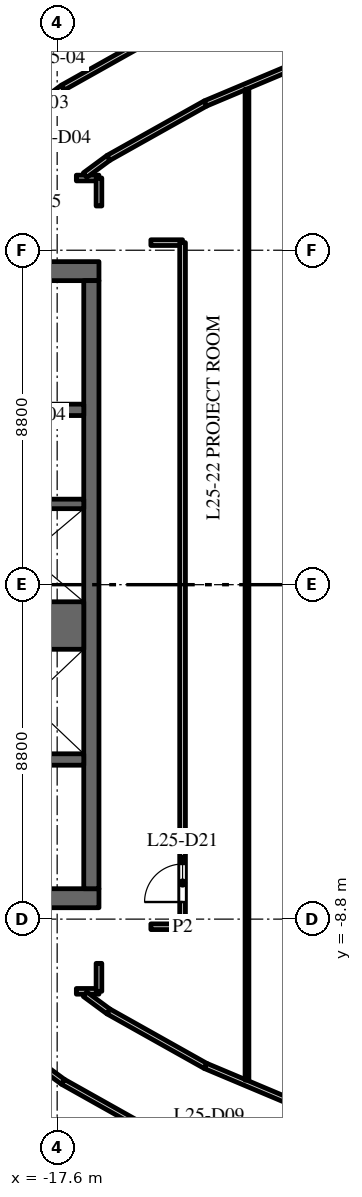
"""IFC4 building model, lengths in metres.
Left out: names, types, materials, properties, quantities, classifications, styles, units other than length and angle.
Written with IfcOpenShell. Run it as: python <this file> out.ifc"""

import sys

from ifc_helpers import new_model, si_unit, direction, frame, frame_2d, origin, place, context, subcontext, project, spatial, rectangle, extrude, element, fill, save


model = new_model("IFC4")
c1 = context("Model", 3, precision=1e-05, world=origin(), true_north=direction((0.0, 1.0)))
c2 = subcontext(c1, "Body", "Model", "MODEL_VIEW")
j1 = project(units=[si_unit("LENGTHUNIT", "METRE"), si_unit("PLANEANGLEUNIT", "RADIAN")], contexts=[c1])
p1 = place(None, origin())
s1 = spatial("IfcSite", under=j1, at=p1, CompositionType="ELEMENT")
p2 = place(p1, origin())
s2 = spatial("IfcBuilding", under=s1, at=p2, CompositionType="ELEMENT")
p3 = place(p2, frame((0.0, 0.0, 112.0)))
s3 = spatial("IfcBuildingStorey", under=s2, at=p3, CompositionType="ELEMENT", Elevation=112.0)
p4 = place(p3, frame((-16.5, 8.25, 0.0), z_axis=(0.0, 0.0, 1.0), x_axis=(-1.0, 0.0, 0.0)))
e1 = element("IfcWall", 1, at=p4, inside=s3, PredefinedType="SHEAR", context=c2, shape_type="SweptSolid", body=[
    extrude(rectangle(XDim=15.0, YDim=0.5, at=frame_2d((7.5, 0.0))), origin(), (0.0, 0.0, 1.0), 3.7),
])
p5 = place(p4, frame((6.9, 0.0, 0.0)))
e2 = element("IfcOpeningElement", 2, at=p5, cuts=e1, PredefinedType="OPENING", context=c2, shape_type="SweptSolid", body=[
    extrude(rectangle(XDim=1.2, YDim=2.1, at=frame_2d((0.6, 1.05))), frame((0.0, 0.26, 0.0), z_axis=(0.0, -1.0, 0.0), x_axis=(1.0, 0.0, 0.0)), (0.0, 0.0, 1.0), 0.52),
])
p6 = place(p4, frame((12.95, 0.0, 0.0)))
e3 = element("IfcOpeningElement", 3, at=p6, cuts=e1, PredefinedType="OPENING", context=c2, shape_type="SweptSolid", body=[
    extrude(rectangle(XDim=0.9, YDim=2.1, at=frame_2d((0.45, 1.05))), frame((0.0, 0.26, 0.0), z_axis=(0.0, -1.0, 0.0), x_axis=(1.0, 0.0, 0.0)), (0.0, 0.0, 1.0), 0.52),
])
p7 = place(p3, frame((-16.5, -8.25, 0.0), z_axis=(0.0, 0.0, 1.0), x_axis=(-1.0, 0.0, 0.0)))
e4 = element("IfcWall", 4, at=p7, inside=s3, PredefinedType="SHEAR", context=c2, shape_type="SweptSolid", body=[
    extrude(rectangle(XDim=15.0, YDim=0.5, at=frame_2d((7.5, 0.0))), origin(), (0.0, 0.0, 1.0), 3.7),
])
p8 = place(p7, frame((6.9, 0.0, 0.0)))
e5 = element("IfcOpeningElement", 5, at=p8, cuts=e4, PredefinedType="OPENING", context=c2, shape_type="SweptSolid", body=[
    extrude(rectangle(XDim=1.2, YDim=2.1, at=frame_2d((0.6, 1.05))), frame((0.0, 0.26, 0.0), z_axis=(0.0, -1.0, 0.0), x_axis=(1.0, 0.0, 0.0)), (0.0, 0.0, 1.0), 0.52),
])
p9 = place(p7, frame((12.95, 0.0, 0.0)))
e6 = element("IfcOpeningElement", 6, at=p9, cuts=e4, PredefinedType="OPENING", context=c2, shape_type="SweptSolid", body=[
    extrude(rectangle(XDim=0.9, YDim=2.1, at=frame_2d((0.45, 1.05))), frame((0.0, 0.26, 0.0), z_axis=(0.0, -1.0, 0.0), x_axis=(1.0, 0.0, 0.0)), (0.0, 0.0, 1.0), 0.52),
])
p10 = place(p3, frame((-16.7, -8.0, 0.0), z_axis=(0.0, 0.0, 1.0), x_axis=(0.0, 1.0, 0.0)))
e7 = element("IfcWall", 7, at=p10, inside=s3, PredefinedType="SHEAR", context=c2, shape_type="SweptSolid", body=[
    extrude(rectangle(XDim=16.0, YDim=0.4, at=frame_2d((8.0, 0.0))), origin(), (0.0, 0.0, 1.0), 3.7),
])
p11 = place(p3, frame((-16.9, -1.075, 0.0), z_axis=(0.0, 0.0, 1.0), x_axis=(-1.0, 0.0, 0.0)))
e8 = element("IfcWall", 8, at=p11, inside=s3, PredefinedType="SHEAR", context=c2, shape_type="SweptSolid", body=[
    extrude(rectangle(XDim=2.9, YDim=1.25, at=frame_2d((1.45, 0.0))), origin(), (0.0, 0.0, 1.0), 3.7),
])
p12 = place(p3, frame((-16.9, 2.125, 0.0), z_axis=(0.0, 0.0, 1.0), x_axis=(-1.0, 0.0, 0.0)))
e9 = element("IfcWall", 9, at=p12, inside=s3, PredefinedType="SHEAR", context=c2, shape_type="SweptSolid", body=[
    extrude(rectangle(XDim=2.9, YDim=0.25, at=frame_2d((1.45, 0.0))), origin(), (0.0, 0.0, 1.0), 3.7),
])
p13 = place(p3, frame((-16.9, 4.6, 0.0), z_axis=(0.0, 0.0, 1.0), x_axis=(-1.0, 0.0, 0.0)))
e10 = element("IfcWall", 10, at=p13, inside=s3, PredefinedType="SHEAR", context=c2, shape_type="SweptSolid", body=[
    extrude(rectangle(XDim=6.18, YDim=0.3, at=frame_2d((3.09, 0.0))), origin(), (0.0, 0.0, 1.0), 3.7),
])
p14 = place(p13, frame((4.9, 0.0, 0.0)))
e11 = element("IfcOpeningElement", 11, at=p14, cuts=e10, PredefinedType="OPENING", context=c2, shape_type="SweptSolid", body=[
    extrude(rectangle(XDim=1.1, YDim=2.1, at=frame_2d((0.55, 1.05))), frame((0.0, 0.16, 0.0), z_axis=(0.0, -1.0, 0.0), x_axis=(1.0, 0.0, 0.0)), (0.0, 0.0, 1.0), 0.32),
])
p15 = place(p3, frame((-16.9, -4.6, 0.0), z_axis=(0.0, 0.0, 1.0), x_axis=(-1.0, 0.0, 0.0)))
e12 = element("IfcWall", 12, at=p15, inside=s3, PredefinedType="SHEAR", context=c2, shape_type="SweptSolid", body=[
    extrude(rectangle(XDim=6.18, YDim=0.3, at=frame_2d((3.09, 0.0))), origin(), (0.0, 0.0, 1.0), 3.7),
])
p16 = place(p15, frame((4.9, 0.0, 0.0)))
e13 = element("IfcOpeningElement", 13, at=p16, cuts=e12, PredefinedType="OPENING", context=c2, shape_type="SweptSolid", body=[
    extrude(rectangle(XDim=1.1, YDim=2.1, at=frame_2d((0.55, 1.05))), frame((0.0, 0.16, 0.0), z_axis=(0.0, -1.0, 0.0), x_axis=(1.0, 0.0, 0.0)), (0.0, 0.0, 1.0), 0.32),
])
p17 = place(p3, frame((-20.428, 13.245, 0.0), z_axis=(0.0, 0.0, 1.0), x_axis=(0.80538609279, 0.592750572788, 0.0)))
e14 = element("IfcWall", 14, at=p17, inside=s3, PredefinedType="PARTITIONING", context=c2, shape_type="SweptSolid", body=[
    extrude(rectangle(XDim=5.461, YDim=0.15, at=frame_2d((2.73, 0.0))), origin(), (0.0, 0.0, 1.0), 2.75),
])
p18 = place(p17, frame((4.061, 0.0, 0.0)))
e15 = element("IfcOpeningElement", 15, at=p18, cuts=e14, PredefinedType="OPENING", context=c2, shape_type="SweptSolid", body=[
    extrude(rectangle(XDim=1.0, YDim=2.1, at=frame_2d((0.5, 1.05))), frame((0.0, 0.085, 0.0), z_axis=(0.0, -1.0, 0.0), x_axis=(1.0, 0.0, 0.0)), (0.0, 0.0, 1.0), 0.17),
])
p19 = place(p17, frame((2.24, 0.0, 0.0)))
e16 = element("IfcOpeningElement", 16, at=p19, cuts=e14, PredefinedType="OPENING", context=c2, shape_type="SweptSolid", body=[
    extrude(rectangle(XDim=1.0, YDim=2.1, at=frame_2d((0.5, 1.05))), frame((0.0, 0.085, 0.0), z_axis=(0.0, -1.0, 0.0), x_axis=(1.0, 0.0, 0.0)), (0.0, 0.0, 1.0), 0.17),
])
p20 = place(p17, frame((0.42, 0.0, 0.0)))
e17 = element("IfcOpeningElement", 17, at=p20, cuts=e14, PredefinedType="OPENING", context=c2, shape_type="SweptSolid", body=[
    extrude(rectangle(XDim=1.0, YDim=2.1, at=frame_2d((0.5, 1.05))), frame((0.0, 0.085, 0.0), z_axis=(0.0, -1.0, 0.0), x_axis=(1.0, 0.0, 0.0)), (0.0, 0.0, 1.0), 0.17),
])
p21 = place(p3, frame((-19.919, 11.26, 0.0), z_axis=(0.0, 0.0, 1.0), x_axis=(0.805185638843, 0.593022838516, 0.0)))
e18 = element("IfcWall", 18, at=p21, inside=s3, PredefinedType="PARTITIONING", context=c2, shape_type="SweptSolid", body=[
    extrude(rectangle(XDim=3.073, YDim=0.15, at=frame_2d((1.536, 0.0))), origin(), (0.0, 0.0, 1.0), 2.75),
])
p22 = place(p3, frame((-19.903, -11.272, 0.0), z_axis=(0.0, 0.0, 1.0), x_axis=(0.805228684186, -0.592964388613, 0.0)))
e19 = element("IfcWall", 19, at=p22, inside=s3, PredefinedType="PARTITIONING", context=c2, shape_type="SweptSolid", body=[
    extrude(rectangle(XDim=3.052, YDim=0.15, at=frame_2d((1.526, 0.0))), origin(), (0.0, 0.0, 1.0), 2.75),
])
for number, where, z_axis, x_axis in (
    (20, (-17.445, -13.082, 0.0), (0.0, 0.0, 1.0), (0.872, -0.489, 0.0)),
    (21, (-17.445, 13.082, 0.0), (0.0, 0.0, 1.0), (0.872, 0.489, 0.0)),
):
    element("IfcWall", number, at=place(p3, frame(where, z_axis=z_axis, x_axis=x_axis)), inside=s3, PredefinedType="PARTITIONING", context=c2, shape_type="SweptSolid", body=[
        extrude(rectangle(XDim=3.188, YDim=0.15, at=frame_2d((1.594, 0.0))), origin(), (0.0, 0.0, 1.0), 3.7),
    ])
p23 = place(p3, frame((-17.095, -10.7, 0.0), z_axis=(0.0, 0.0, 1.0), x_axis=(1.0, 0.0, 0.0)))
e22 = element("IfcWall", 22, at=p23, inside=s3, PredefinedType="PARTITIONING", context=c2, shape_type="SweptSolid", body=[
    extrude(rectangle(XDim=0.595, YDim=0.15, at=frame_2d((0.297, 0.0))), origin(), (0.0, 0.0, 1.0), 3.7),
])
p24 = place(p3, frame((-16.867, -10.775, 0.0), z_axis=(0.0, 0.0, 1.0), x_axis=(0.804751563869, -0.593611759023, 0.0)))
e23 = element("IfcWall", 23, at=p24, inside=s3, PredefinedType="PARTITIONING", context=c2, shape_type="SweptSolid", body=[
    extrude(rectangle(XDim=0.767, YDim=0.15, at=frame_2d((0.383, 0.0))), origin(), (0.0, 0.0, 1.0), 3.7),
])
p25 = place(p3, frame((-17.095, 10.7, 0.0), z_axis=(0.0, 0.0, 1.0), x_axis=(1.0, 0.0, 0.0)))
e24 = element("IfcWall", 24, at=p25, inside=s3, PredefinedType="PARTITIONING", context=c2, shape_type="SweptSolid", body=[
    extrude(rectangle(XDim=0.595, YDim=0.15, at=frame_2d((0.297, 0.0))), origin(), (0.0, 0.0, 1.0), 3.7),
])
p26 = place(p3, frame((-16.867, 10.775, 0.0), z_axis=(0.0, 0.0, 1.0), x_axis=(0.804751563869, 0.593611759023, 0.0)))
e25 = element("IfcWall", 25, at=p26, inside=s3, PredefinedType="PARTITIONING", context=c2, shape_type="SweptSolid", body=[
    extrude(rectangle(XDim=0.767, YDim=0.15, at=frame_2d((0.383, 0.0))), origin(), (0.0, 0.0, 1.0), 3.7),
])
for number, where, z_axis, x_axis in (
    (26, (-16.5, -10.7, 0.0), (0.0, 0.0, 1.0), (0.0, 1.0, 0.0)),
    (27, (-16.5, 9.964, 0.0), (0.0, 0.0, 1.0), (0.0, 1.0, 0.0)),
):
    element("IfcWall", number, at=place(p3, frame(where, z_axis=z_axis, x_axis=x_axis)), inside=s3, PredefinedType="PARTITIONING", context=c2, shape_type="SweptSolid", body=[
        extrude(rectangle(XDim=0.736, YDim=0.15, at=frame_2d((0.368, 0.0))), origin(), (0.0, 0.0, 1.0), 3.7),
    ])
for number, where, z_axis, x_axis in (
    (28, (-16.25, -11.23, 0.0), (0.0, 0.0, 1.0), (0.872, -0.489, 0.0)),
    (29, (-16.25, 11.23, 0.0), (0.0, 0.0, 1.0), (0.872, 0.489, 0.0)),
):
    element("IfcWall", number, at=place(p3, frame(where, z_axis=z_axis, x_axis=x_axis)), inside=s3, PredefinedType="PARTITIONING", context=c2, shape_type="SweptSolid", body=[
        extrude(rectangle(XDim=2.927, YDim=0.15, at=frame_2d((1.464, 0.0))), origin(), (0.0, 0.0, 1.0), 2.75),
    ])
for number, where, z_axis, x_axis in (
    (30, (-15.134, -9.0, 0.0), (0.0, 0.0, 1.0), (1.0, 0.0, 0.0)),
    (31, (-15.134, 9.0, 0.0), (0.0, 0.0, 1.0), (1.0, 0.0, 0.0)),
):
    element("IfcWall", number, at=place(p3, frame(where, z_axis=z_axis, x_axis=x_axis)), inside=s3, PredefinedType="PARTITIONING", context=c2, shape_type="SweptSolid", body=[
        extrude(rectangle(XDim=0.834, YDim=0.15, at=frame_2d((0.417, 0.0))), origin(), (0.0, 0.0, 1.0), 3.7),
    ])
p27 = place(p3, frame((-14.3, -9.0, 0.0), z_axis=(0.0, 0.0, 1.0), x_axis=(0.0, 1.0, 0.0)))
e32 = element("IfcWall", 32, at=p27, inside=s3, PredefinedType="PARTITIONING", context=c2, shape_type="SweptSolid", body=[
    extrude(rectangle(XDim=18.0, YDim=0.15, at=frame_2d((9.0, 0.0))), origin(), (0.0, 0.0, 1.0), 3.7),
])
p28 = place(p27, frame((0.65, 0.0, 0.0)))
e33 = element("IfcOpeningElement", 33, at=p28, cuts=e32, PredefinedType="OPENING", context=c2, shape_type="SweptSolid", body=[
    extrude(rectangle(XDim=1.0, YDim=2.1, at=frame_2d((0.5, 1.05))), frame((0.0, 0.085, 0.0), z_axis=(0.0, -1.0, 0.0), x_axis=(1.0, 0.0, 0.0)), (0.0, 0.0, 1.0), 0.17),
])
for number, where, z_axis, x_axis in (
    (34, (-13.697, -12.662, 0.0), (0.0, 0.0, 1.0), (0.922, -0.388, 0.0)),
    (35, (-13.697, 12.662, 0.0), (0.0, 0.0, 1.0), (0.922, 0.388, 0.0)),
):
    element("IfcWall", number, at=place(p3, frame(where, z_axis=z_axis, x_axis=x_axis)), inside=s3, PredefinedType="PARTITIONING", context=c2, shape_type="SweptSolid", body=[
        extrude(rectangle(XDim=3.038, YDim=0.15, at=frame_2d((1.519, 0.0))), origin(), (0.0, 0.0, 1.0), 2.85),
    ])
p29 = place(p3, frame((-12.605, -13.036, 0.0), z_axis=(0.0, 0.0, 1.0), x_axis=(0.0, 1.0, 0.0)))
e36 = element("IfcWall", 36, at=p29, inside=s3, PredefinedType="PARTITIONING", context=c2, shape_type="SweptSolid", body=[
    extrude(rectangle(XDim=26.072, YDim=0.1, at=frame_2d((13.036, 0.0))), origin(), (0.0, 0.0, 1.0), 2.75),
])
p30 = place(p28, origin())
e37 = element("IfcDoor", 37, at=p30, inside=s3, OperationType="SINGLE_SWING_LEFT", PredefinedType="DOOR", context=c2, shape_type="SweptSolid", body=[
    extrude(rectangle(XDim=1.0, YDim=2.1, at=frame_2d((0.5, 1.05))), frame((0.0, 0.025, 0.0), z_axis=(0.0, -1.0, 0.0), x_axis=(1.0, 0.0, 0.0)), (0.0, 0.0, 1.0), 0.05),
])
fill(e33, e37)
save(model, sys.argv[1])
